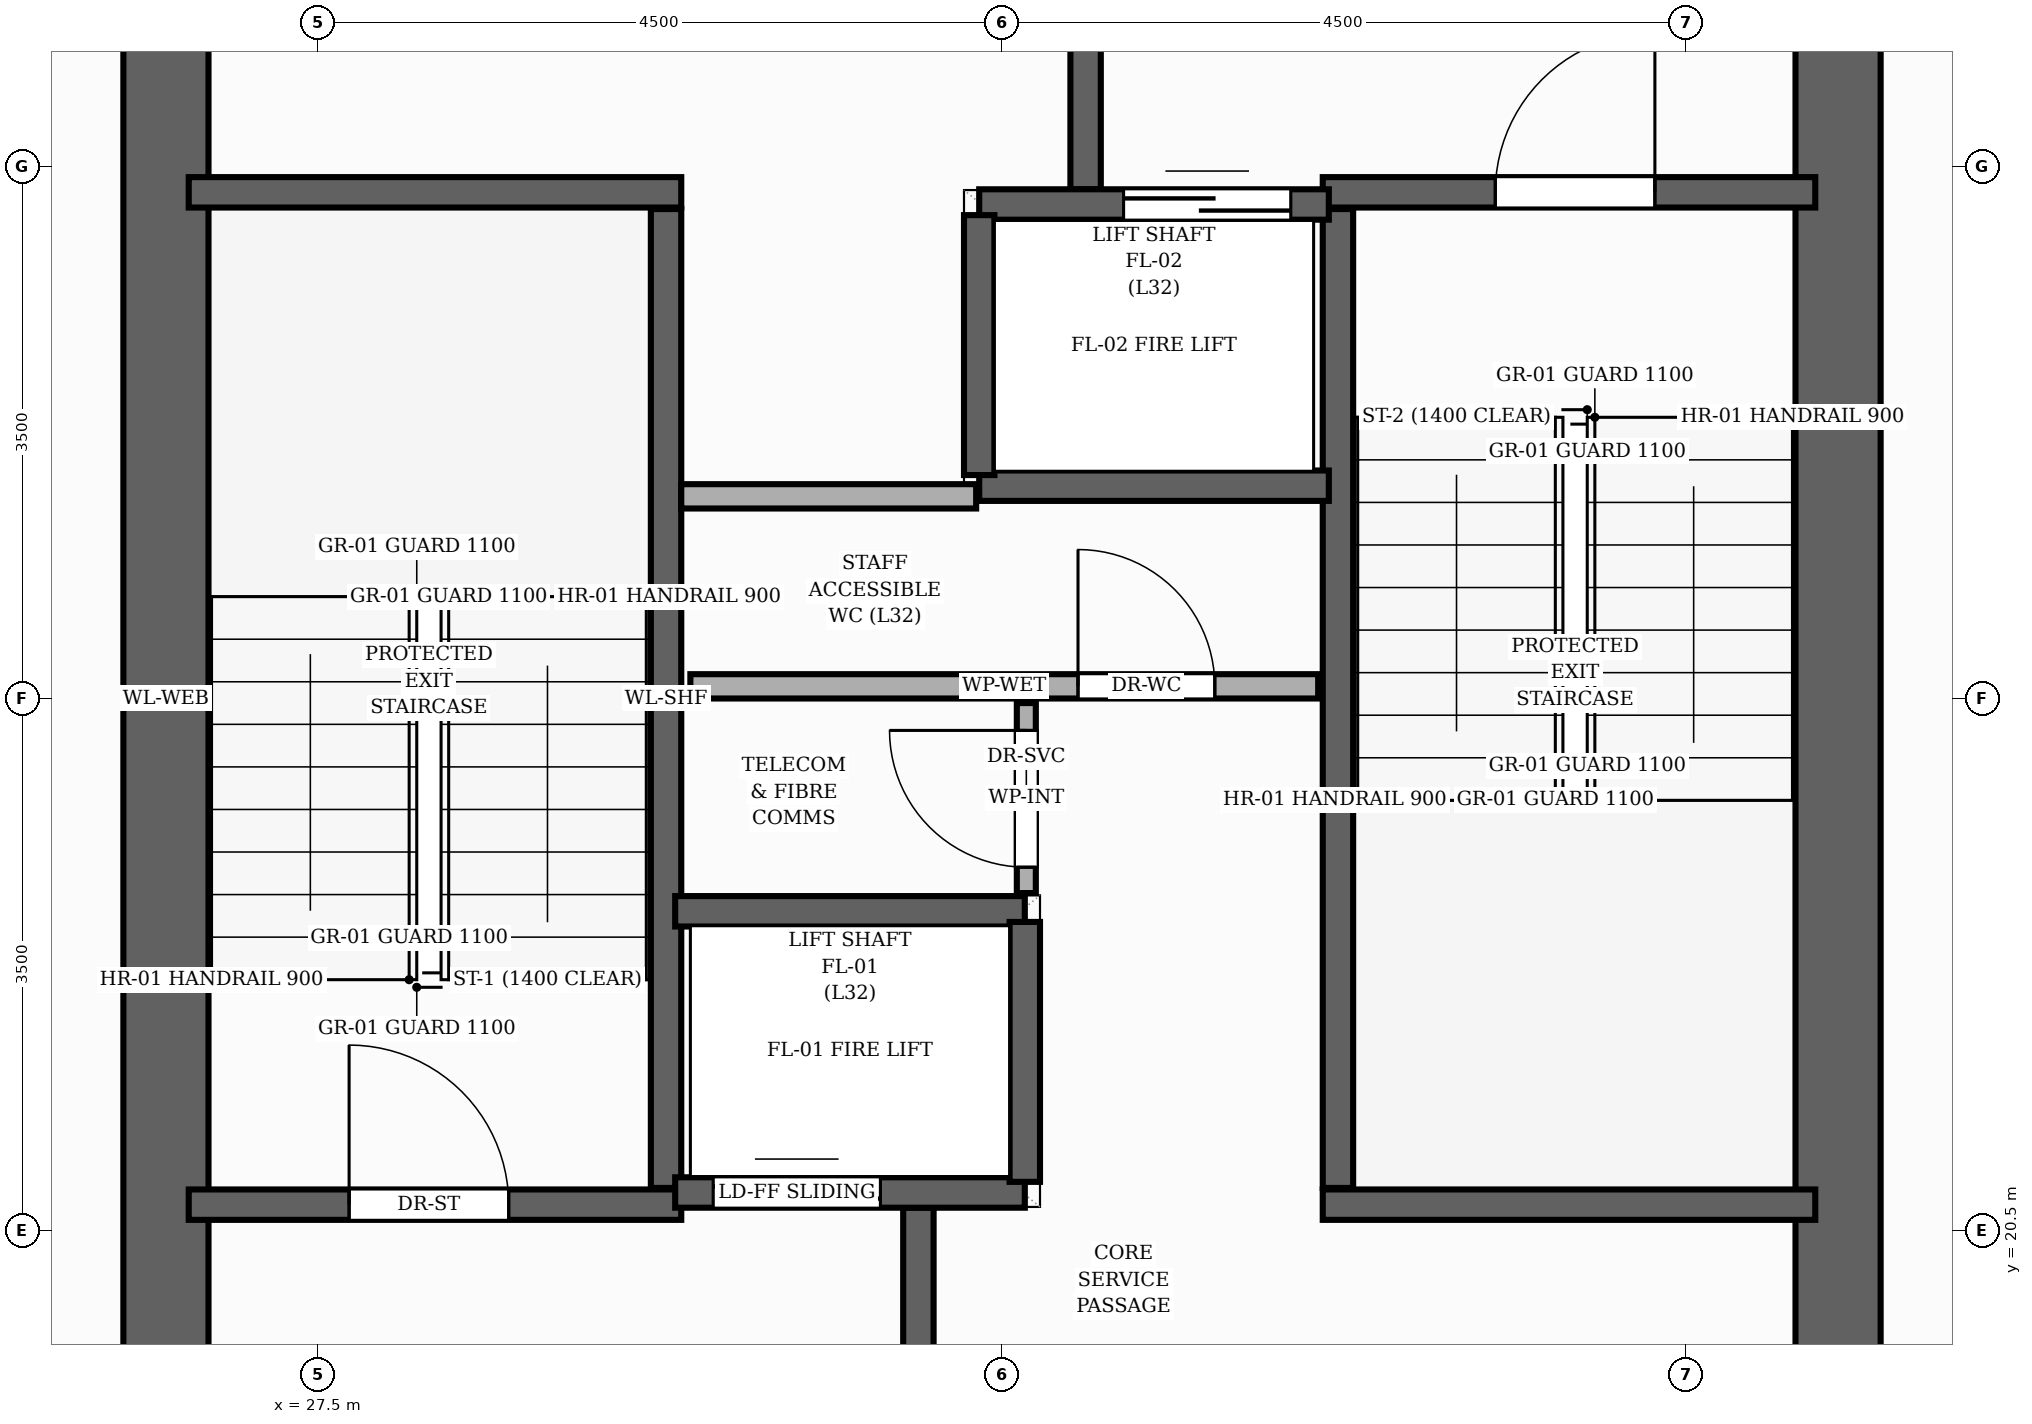
"""IFC4 building model, lengths in metres.
Left out: names, types, materials, properties, quantities, classifications, styles, units other than length and angle.
Written with IfcOpenShell. Run it as: python <this file> out.ifc"""

import sys

from ifc_helpers import new_model, si_unit, direction, frame, frame_2d, origin, place, context, subcontext, project, spatial, rectangle, extrude, element, fill, save


model = new_model("IFC4")
c1 = context("Model", 3, precision=1e-05, world=origin(), true_north=direction((0.0, 1.0)))
c2 = subcontext(c1, "Body", "Model", "MODEL_VIEW")
j1 = project(units=[si_unit("LENGTHUNIT", "METRE"), si_unit("PLANEANGLEUNIT", "RADIAN")], contexts=[c1])
p1 = place(None, origin())
s1 = spatial("IfcSite", under=j1, at=p1, CompositionType="ELEMENT")
p2 = place(p1, origin())
s2 = spatial("IfcBuilding", under=s1, at=p2, CompositionType="ELEMENT")
p3 = place(p2, frame((0.0, 0.0, 109.28)))
s3 = spatial("IfcBuildingStorey", under=s2, at=p3, CompositionType="ELEMENT", Elevation=109.28)
for number, where, z_axis, x_axis in (
    (1, (26.5, 17.35, 0.0), (0.0, 0.0, 1.0), (0.0, 1.0, 0.0)),
    (2, (37.5, 17.35, 0.0), (0.0, 0.0, 1.0), (0.0, 1.0, 0.0)),
):
    element("IfcWall", number, at=place(p3, frame(where, z_axis=z_axis, x_axis=x_axis)), inside=s3, PredefinedType="SHEAR", context=c2, shape_type="SweptSolid", body=[
        extrude(rectangle(XDim=13.3, YDim=0.56, at=frame_2d((6.65, 0.0))), origin(), (0.0, 0.0, 1.0), 3.2),
    ])
p4 = place(p3, frame((29.79, 20.78, 0.0), z_axis=(0.0, 0.0, 1.0), x_axis=(0.0, 1.0, 0.0)))
e3 = element("IfcWall", 3, at=p4, inside=s3, PredefinedType="SHEAR", context=c2, shape_type="SweptSolid", body=[
    extrude(rectangle(XDim=6.44, YDim=0.2, at=frame_2d((3.22, 0.0))), origin(), (0.0, 0.0, 1.0), 3.2),
])
p5 = place(p3, frame((26.65, 27.33, 0.0), z_axis=(0.0, 0.0, 1.0), x_axis=(1.0, 0.0, 0.0)))
e4 = element("IfcWall", 4, at=p5, inside=s3, PredefinedType="SHEAR", context=c2, shape_type="SweptSolid", body=[
    extrude(rectangle(XDim=3.24, YDim=0.2, at=frame_2d((1.62, 0.0))), origin(), (0.0, 0.0, 1.0), 3.2),
])
p6 = place(p3, frame((26.65, 20.67, 0.0), z_axis=(0.0, 0.0, 1.0), x_axis=(1.0, 0.0, 0.0)))
e5 = element("IfcWall", 5, at=p6, inside=s3, PredefinedType="SHEAR", context=c2, shape_type="SweptSolid", body=[
    extrude(rectangle(XDim=3.24, YDim=0.2, at=frame_2d((1.62, 0.0))), origin(), (0.0, 0.0, 1.0), 3.2),
])
p7 = place(p6, frame((1.055, 0.0, 0.0)))
e6 = element("IfcOpeningElement", 6, at=p7, cuts=e5, PredefinedType="OPENING", context=c2, shape_type="SweptSolid", body=[
    extrude(rectangle(XDim=1.05, YDim=2.15, at=frame_2d((0.525, 1.075))), frame((0.0, 0.11, 0.0), z_axis=(0.0, -1.0, 0.0), x_axis=(1.0, 0.0, 0.0)), (0.0, 0.0, 1.0), 0.22),
])
p8 = place(p3, frame((34.21, 20.78, 0.0), z_axis=(0.0, 0.0, 1.0), x_axis=(0.0, 1.0, 0.0)))
e7 = element("IfcWall", 7, at=p8, inside=s3, PredefinedType="SHEAR", context=c2, shape_type="SweptSolid", body=[
    extrude(rectangle(XDim=6.44, YDim=0.2, at=frame_2d((3.22, 0.0))), origin(), (0.0, 0.0, 1.0), 3.2),
])
p9 = place(p3, frame((34.11, 20.67, 0.0), z_axis=(0.0, 0.0, 1.0), x_axis=(1.0, 0.0, 0.0)))
e8 = element("IfcWall", 8, at=p9, inside=s3, PredefinedType="SHEAR", context=c2, shape_type="SweptSolid", body=[
    extrude(rectangle(XDim=3.24, YDim=0.2, at=frame_2d((1.62, 0.0))), origin(), (0.0, 0.0, 1.0), 3.2),
])
p10 = place(p3, frame((34.11, 27.33, 0.0), z_axis=(0.0, 0.0, 1.0), x_axis=(1.0, 0.0, 0.0)))
e9 = element("IfcWall", 9, at=p10, inside=s3, PredefinedType="SHEAR", context=c2, shape_type="SweptSolid", body=[
    extrude(rectangle(XDim=3.24, YDim=0.2, at=frame_2d((1.62, 0.0))), origin(), (0.0, 0.0, 1.0), 3.2),
])
p11 = place(p10, frame((1.135, 0.0, 0.0)))
e10 = element("IfcOpeningElement", 10, at=p11, cuts=e9, PredefinedType="OPENING", context=c2, shape_type="SweptSolid", body=[
    extrude(rectangle(XDim=1.05, YDim=2.15, at=frame_2d((0.525, 1.075))), frame((0.0, 0.11, 0.0), z_axis=(0.0, -1.0, 0.0), x_axis=(1.0, 0.0, 0.0)), (0.0, 0.0, 1.0), 0.22),
])
for number, where, z_axis, x_axis in (
    (11, (31.45, 17.15, 0.0), (0.0, 0.0, 1.0), (0.0, 1.0, 0.0)),
    (12, (32.55, 27.35, 0.0), (0.0, 0.0, 1.0), (0.0, 1.0, 0.0)),
):
    element("IfcWall", number, at=place(p3, frame(where, z_axis=z_axis, x_axis=x_axis)), inside=s3, PredefinedType="SHEAR", context=c2, shape_type="SweptSolid", body=[
        extrude(rectangle(XDim=3.5, YDim=0.2, at=frame_2d((1.75, 0.0))), origin(), (0.0, 0.0, 1.0), 3.2),
    ])
p12 = place(p3, frame((29.85, 20.75, 0.0), z_axis=(0.0, 0.0, 1.0), x_axis=(1.0, 0.0, 0.0)))
e13 = element("IfcWall", 13, at=p12, inside=s3, PredefinedType="SHEAR", context=c2, shape_type="SweptSolid", body=[
    extrude(rectangle(XDim=2.3, YDim=0.2, at=frame_2d((1.15, 0.0))), origin(), (0.0, 0.0, 1.0), 3.2),
])
p13 = place(p12, frame((0.25, 0.0, 0.0)))
e14 = element("IfcOpeningElement", 14, at=p13, cuts=e13, PredefinedType="OPENING", context=c2, shape_type="SweptSolid", body=[
    extrude(rectangle(XDim=1.1, YDim=2.15, at=frame_2d((0.55, 1.075))), frame((0.0, 0.11, 0.0), z_axis=(0.0, -1.0, 0.0), x_axis=(1.0, 0.0, 0.0)), (0.0, 0.0, 1.0), 0.22),
])
p14 = place(p3, frame((29.85, 22.6, 0.0), z_axis=(0.0, 0.0, 1.0), x_axis=(1.0, 0.0, 0.0)))
e15 = element("IfcWall", 15, at=p14, inside=s3, PredefinedType="SHEAR", context=c2, shape_type="SweptSolid", body=[
    extrude(rectangle(XDim=2.3, YDim=0.2, at=frame_2d((1.15, 0.0))), origin(), (0.0, 0.0, 1.0), 3.2),
])
p15 = place(p3, frame((32.15, 20.82, 0.0), z_axis=(0.0, 0.0, 1.0), x_axis=(0.0, 1.0, 0.0)))
e16 = element("IfcWall", 16, at=p15, inside=s3, PredefinedType="SHEAR", context=c2, shape_type="SweptSolid", body=[
    extrude(rectangle(XDim=1.71, YDim=0.2, at=frame_2d((0.855, 0.0))), origin(), (0.0, 0.0, 1.0), 3.2),
])
p16 = place(p3, frame((31.85, 27.25, 0.0), z_axis=(0.0, 0.0, 1.0), x_axis=(1.0, 0.0, 0.0)))
e17 = element("IfcWall", 17, at=p16, inside=s3, PredefinedType="SHEAR", context=c2, shape_type="SweptSolid", body=[
    extrude(rectangle(XDim=2.3, YDim=0.2, at=frame_2d((1.15, 0.0))), origin(), (0.0, 0.0, 1.0), 3.2),
])
p17 = place(p16, frame((0.95, 0.0, 0.0)))
e18 = element("IfcOpeningElement", 18, at=p17, cuts=e17, PredefinedType="OPENING", context=c2, shape_type="SweptSolid", body=[
    extrude(rectangle(XDim=1.1, YDim=2.15, at=frame_2d((0.55, 1.075))), frame((0.0, 0.11, 0.0), z_axis=(0.0, -1.0, 0.0), x_axis=(1.0, 0.0, 0.0)), (0.0, 0.0, 1.0), 0.22),
])
p18 = place(p3, frame((31.85, 25.4, 0.0), z_axis=(0.0, 0.0, 1.0), x_axis=(1.0, 0.0, 0.0)))
e19 = element("IfcWall", 19, at=p18, inside=s3, PredefinedType="SHEAR", context=c2, shape_type="SweptSolid", body=[
    extrude(rectangle(XDim=2.3, YDim=0.2, at=frame_2d((1.15, 0.0))), origin(), (0.0, 0.0, 1.0), 3.2),
])
p19 = place(p3, frame((31.85, 25.47, 0.0), z_axis=(0.0, 0.0, 1.0), x_axis=(0.0, 1.0, 0.0)))
e20 = element("IfcWall", 20, at=p19, inside=s3, PredefinedType="SHEAR", context=c2, shape_type="SweptSolid", body=[
    extrude(rectangle(XDim=1.71, YDim=0.2, at=frame_2d((0.855, 0.0))), origin(), (0.0, 0.0, 1.0), 3.2),
])
p20 = place(p3, frame((29.95, 24.08, 0.0), z_axis=(0.0, 0.0, 1.0), x_axis=(1.0, 0.0, 0.0)))
e21 = element("IfcWall", 21, at=p20, inside=s3, PredefinedType="PLUMBINGWALL", context=c2, shape_type="SweptSolid", body=[
    extrude(rectangle(XDim=4.13, YDim=0.16, at=frame_2d((2.065, 0.0))), origin(), (0.0, 0.0, 1.0), 2.795),
])
p21 = place(p20, frame((2.55, 0.0, 0.0)))
e22 = element("IfcOpeningElement", 22, at=p21, cuts=e21, PredefinedType="OPENING", context=c2, shape_type="SweptSolid", body=[
    extrude(rectangle(XDim=0.9, YDim=2.1, at=frame_2d((0.45, 1.05))), frame((0.0, 0.09, 0.0), z_axis=(0.0, -1.0, 0.0), x_axis=(1.0, 0.0, 0.0)), (0.0, 0.0, 1.0), 0.18),
])
p22 = place(p3, frame((32.16, 22.72, 0.0), z_axis=(0.0, 0.0, 1.0), x_axis=(0.0, 1.0, 0.0)))
e23 = element("IfcWall", 23, at=p22, inside=s3, PredefinedType="PARTITIONING", context=c2, shape_type="SweptSolid", body=[
    extrude(rectangle(XDim=1.25, YDim=0.125, at=frame_2d((0.625, 0.0))), origin(), (0.0, 0.0, 1.0), 2.795),
])
p23 = place(p22, frame((0.17, 0.0, 0.0)))
e24 = element("IfcOpeningElement", 24, at=p23, cuts=e23, PredefinedType="OPENING", context=c2, shape_type="SweptSolid", body=[
    extrude(rectangle(XDim=0.9, YDim=2.1, at=frame_2d((0.45, 1.05))), frame((0.0, 0.073, 0.0), z_axis=(0.0, -1.0, 0.0), x_axis=(1.0, 0.0, 0.0)), (0.0, 0.0, 1.0), 0.145),
])
p24 = place(p3, frame((29.89, 25.33, 0.0), z_axis=(0.0, 0.0, 1.0), x_axis=(1.0, 0.0, 0.0)))
e25 = element("IfcWall", 25, at=p24, inside=s3, PredefinedType="PLUMBINGWALL", context=c2, shape_type="SweptSolid", body=[
    extrude(rectangle(XDim=1.94, YDim=0.16, at=frame_2d((0.97, 0.0))), origin(), (0.0, 0.0, 1.0), 2.795),
])
p25 = place(p7, origin())
e26 = element("IfcDoor", 26, at=p25, inside=s3, OperationType="SINGLE_SWING_LEFT", PredefinedType="DOOR", context=c2, shape_type="SweptSolid", body=[
    extrude(rectangle(XDim=1.05, YDim=2.15, at=frame_2d((0.525, 1.075))), frame((0.0, 0.025, 0.0), z_axis=(0.0, -1.0, 0.0), x_axis=(1.0, 0.0, 0.0)), (0.0, 0.0, 1.0), 0.05),
])
fill(e6, e26)
p26 = place(p11, origin())
e27 = element("IfcDoor", 27, at=p26, inside=s3, OperationType="SINGLE_SWING_RIGHT", PredefinedType="DOOR", context=c2, shape_type="SweptSolid", body=[
    extrude(rectangle(XDim=1.05, YDim=2.15, at=frame_2d((0.525, 1.075))), frame((0.0, 0.025, 0.0), z_axis=(0.0, -1.0, 0.0), x_axis=(1.0, 0.0, 0.0)), (0.0, 0.0, 1.0), 0.05),
])
fill(e10, e27)
p27 = place(p13, origin())
e28 = element("IfcDoor", 28, at=p27, inside=s3, OperationType="DOUBLE_DOOR_SLIDING", PredefinedType="DOOR", context=c2, shape_type="SweptSolid", body=[
    extrude(rectangle(XDim=1.1, YDim=2.15, at=frame_2d((0.55, 1.075))), frame((0.0, 0.025, 0.0), z_axis=(0.0, -1.0, 0.0), x_axis=(1.0, 0.0, 0.0)), (0.0, 0.0, 1.0), 0.05),
])
fill(e14, e28)
p28 = place(p17, origin())
e29 = element("IfcDoor", 29, at=p28, inside=s3, OperationType="DOUBLE_DOOR_SLIDING", PredefinedType="DOOR", context=c2, shape_type="SweptSolid", body=[
    extrude(rectangle(XDim=1.1, YDim=2.15, at=frame_2d((0.55, 1.075))), frame((0.0, 0.025, 0.0), z_axis=(0.0, -1.0, 0.0), x_axis=(1.0, 0.0, 0.0)), (0.0, 0.0, 1.0), 0.05),
])
fill(e18, e29)
p29 = place(p21, origin())
e30 = element("IfcDoor", 30, at=p29, inside=s3, OperationType="SINGLE_SWING_LEFT", PredefinedType="DOOR", context=c2, shape_type="SweptSolid", body=[
    extrude(rectangle(XDim=0.9, YDim=2.1, at=frame_2d((0.45, 1.05))), frame((0.0, 0.025, 0.0), z_axis=(0.0, -1.0, 0.0), x_axis=(1.0, 0.0, 0.0)), (0.0, 0.0, 1.0), 0.05),
])
fill(e22, e30)
p30 = place(p23, origin())
e31 = element("IfcDoor", 31, at=p30, inside=s3, OperationType="SINGLE_SWING_RIGHT", PredefinedType="DOOR", context=c2, shape_type="SweptSolid", body=[
    extrude(rectangle(XDim=0.9, YDim=2.1, at=frame_2d((0.45, 1.05))), frame((0.0, 0.025, 0.0), z_axis=(0.0, -1.0, 0.0), x_axis=(1.0, 0.0, 0.0)), (0.0, 0.0, 1.0), 0.05),
])
fill(e24, e31)
save(model, sys.argv[1])
